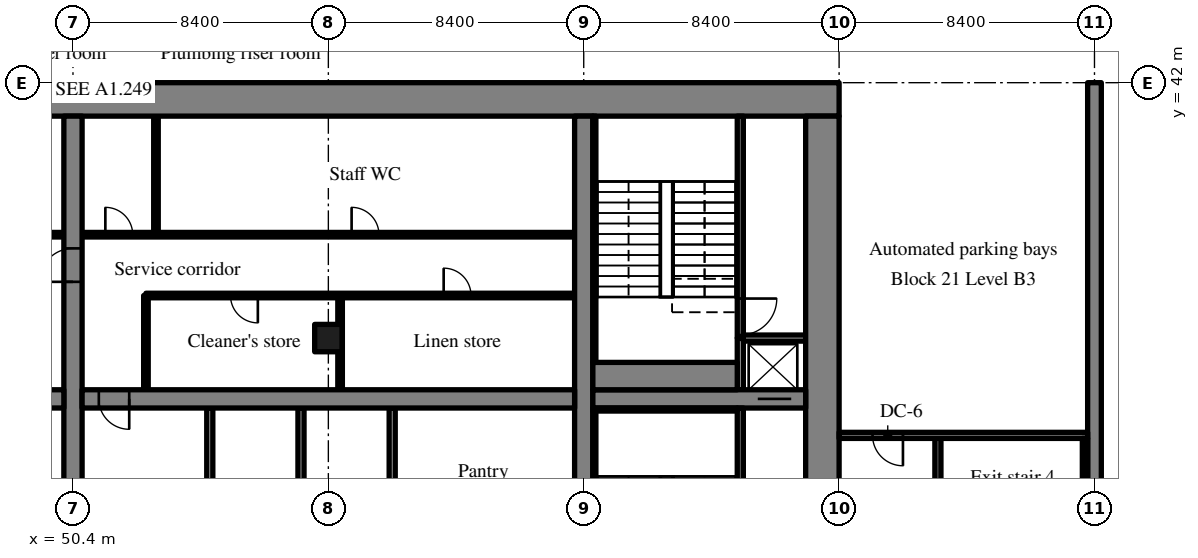
"""IFC4 building model, lengths in metres.
Left out: names, types, materials, properties, quantities, classifications, styles, units other than length and angle.
Written with IfcOpenShell. Run it as: python <this file> out.ifc"""

import sys

from ifc_helpers import new_model, si_unit, direction, frame, frame_2d, origin, origin_2d, place, context, subcontext, project, spatial, rectangle, extrude, source, transform, mapped, element, fill, save


model = new_model("IFC4")
c1 = context("Model", 3, precision=1e-05, world=origin(), true_north=direction((0.0, 1.0)))
c2 = subcontext(c1, "Body", "Model", "MODEL_VIEW")
j1 = project(units=[si_unit("LENGTHUNIT", "METRE"), si_unit("PLANEANGLEUNIT", "RADIAN")], contexts=[c1])
p1 = place(None, origin())
s1 = spatial("IfcSite", under=j1, at=p1, CompositionType="ELEMENT")
p2 = place(p1, origin())
s2 = spatial("IfcBuilding", under=s1, at=p2, CompositionType="ELEMENT")
p3 = place(p2, frame((0.0, 0.0, -13.5)))
s3 = spatial("IfcBuildingStorey", under=s2, at=p3, CompositionType="ELEMENT", Elevation=-13.5)
m1 = source(origin(), c2, "Body", "SweptSolid", [
    extrude(rectangle(XDim=50.4, YDim=1.1, at=frame_2d((25.2, 0.0))), origin(), (0.0, 0.0, 1.0), 4.52),
])
p4 = place(p3, frame((25.2, 41.45, -0.3), z_axis=(0.0, 0.0, 1.0), x_axis=(1.0, 0.0, 0.0)))
e1 = element("IfcWall", 1, at=p4, inside=s3, PredefinedType="SHEAR", context=c2, shape_type="MappedRepresentation", body=[
    mapped(m1, transform((0.0, 0.0, 0.0), scale=1.0)),
])
m2 = source(origin(), c2, "Body", "SweptSolid", [
    extrude(rectangle(XDim=17.8, YDim=1.1, at=frame_2d((8.9, 0.0))), origin(), (0.0, 0.0, 1.0), 4.52),
])
p5 = place(p3, frame((75.05, 23.1, -0.3), z_axis=(0.0, 0.0, 1.0), x_axis=(0.0, 1.0, 0.0)))
e2 = element("IfcWall", 2, at=p5, inside=s3, PredefinedType="SHEAR", context=c2, shape_type="MappedRepresentation", body=[
    mapped(m2, transform((0.0, 0.0, 0.0), scale=1.0)),
])
m3 = source(origin(), c2, "Body", "SweptSolid", [
    extrude(rectangle(XDim=17.8, YDim=0.6, at=frame_2d((8.9, 0.0))), origin(), (0.0, 0.0, 1.0), 4.52),
])
p6 = place(p3, frame((50.4, 23.1, -0.3), z_axis=(0.0, 0.0, 1.0), x_axis=(0.0, 1.0, 0.0)))
e3 = element("IfcWall", 3, at=p6, inside=s3, PredefinedType="SHEAR", context=c2, shape_type="MappedRepresentation", body=[
    mapped(m3, transform((0.0, 0.0, 0.0), scale=1.0)),
])
m4 = source(origin(), c2, "Body", "SweptSolid", [
    extrude(rectangle(XDim=1.1, YDim=2.1, at=frame_2d((0.55, 1.05))), frame((0.0, 0.31, 0.0), z_axis=(0.0, -1.0, 0.0), x_axis=(1.0, 0.0, 0.0)), (0.0, 0.0, 1.0), 0.62),
])
p7 = place(p6, frame((12.35, 0.0, 0.0)))
e4 = element("IfcOpeningElement", 4, at=p7, cuts=e3, PredefinedType="OPENING", context=c2, shape_type="MappedRepresentation", body=[
    mapped(m4, transform((0.0, 0.0, 0.0), scale=1.0)),
])
p8 = place(p3, frame((67.2, 23.1, -0.3), z_axis=(0.0, 0.0, 1.0), x_axis=(0.0, 1.0, 0.0)))
e5 = element("IfcWall", 5, at=p8, inside=s3, PredefinedType="SHEAR", context=c2, shape_type="MappedRepresentation", body=[
    mapped(m3, transform((0.0, 0.0, 0.0), scale=1.0)),
])
m5 = source(origin(), c2, "Body", "SweptSolid", [
    extrude(rectangle(XDim=16.2, YDim=0.6, at=frame_2d((8.1, 0.0))), origin(), (0.0, 0.0, 1.0), 4.52),
])
p9 = place(p3, frame((33.9, 31.6, -0.3), z_axis=(0.0, 0.0, 1.0), x_axis=(1.0, 0.0, 0.0)))
e6 = element("IfcWall", 6, at=p9, inside=s3, PredefinedType="SHEAR", context=c2, shape_type="MappedRepresentation", body=[
    mapped(m5, transform((0.0, 0.0, 0.0), scale=1.0)),
])
m6 = source(origin(), c2, "Body", "SweptSolid", [
    extrude(rectangle(XDim=1.0, YDim=2.1, at=frame_2d((0.5, 1.05))), frame((0.0, 0.31, 0.0), z_axis=(0.0, -1.0, 0.0), x_axis=(1.0, 0.0, 0.0)), (0.0, 0.0, 1.0), 0.62),
])
p10 = place(p9, frame((14.65, 0.0, 0.0)))
e7 = element("IfcOpeningElement", 7, at=p10, cuts=e6, PredefinedType="OPENING", context=c2, shape_type="MappedRepresentation", body=[
    mapped(m6, transform((0.0, 0.0, 0.0), scale=1.0)),
])
m7 = source(origin(), c2, "Body", "SweptSolid", [
    extrude(rectangle(XDim=16.2, YDim=0.6, at=frame_2d((8.1, 0.0))), origin(), (0.0, 0.0, 1.0), 4.52),
])
p11 = place(p3, frame((50.7, 31.6, -0.3), z_axis=(0.0, 0.0, 1.0), x_axis=(1.0, 0.0, 0.0)))
e8 = element("IfcWall", 8, at=p11, inside=s3, PredefinedType="SHEAR", context=c2, shape_type="MappedRepresentation", body=[
    mapped(m7, transform((0.0, 0.0, 0.0), scale=1.0)),
])
p12 = place(p11, frame((0.55, 0.0, 0.0)))
e9 = element("IfcOpeningElement", 9, at=p12, cuts=e8, PredefinedType="OPENING", context=c2, shape_type="MappedRepresentation", body=[
    mapped(m6, transform((0.0, 0.0, 0.0), scale=1.0)),
])
m8 = source(origin(), c2, "Body", "SweptSolid", [
    extrude(rectangle(XDim=7.0, YDim=0.6, at=frame_2d((3.5, 0.0))), origin(), (0.0, 0.0, 1.0), 4.52),
])
p13 = place(p3, frame((67.5, 31.6, -0.3), z_axis=(0.0, 0.0, 1.0), x_axis=(1.0, 0.0, 0.0)))
e10 = element("IfcWall", 10, at=p13, inside=s3, PredefinedType="SHEAR", context=c2, shape_type="MappedRepresentation", body=[
    mapped(m8, transform((0.0, 0.0, 0.0), scale=1.0)),
])
p14 = place(p13, frame((5.425, 0.0, 0.0)))
e11 = element("IfcOpeningElement", 11, at=p14, cuts=e10, PredefinedType="OPENING", context=c2, shape_type="MappedRepresentation", body=[
    mapped(m4, transform((0.0, 0.0, 0.0), scale=1.0)),
])
m9 = source(origin(), c2, "Body", "SweptSolid", [
    extrude(rectangle(XDim=20.0, YDim=0.45, at=frame_2d((10.0, 0.0))), origin(), (0.0, 0.0, 1.0), 4.52),
])
p15 = place(p3, frame((84.0, 22.0, -0.3), z_axis=(0.0, 0.0, 1.0), x_axis=(0.0, 1.0, 0.0)))
e12 = element("IfcWall", 12, at=p15, inside=s3, PredefinedType="SHEAR", context=c2, shape_type="MappedRepresentation", body=[
    mapped(m9, transform((0.0, 0.0, 0.0), scale=1.0)),
])
m10 = source(origin(), c2, "Body", "SweptSolid", [
    extrude(rectangle(XDim=0.9, YDim=0.9, at=origin_2d()), origin(), (0.0, 0.0, 1.0), 4.52),
])
p16 = place(p3, frame((58.8, 33.6, -0.3), z_axis=(0.0, 0.0, 1.0), x_axis=(1.0, 0.0, 0.0)))
e13 = element("IfcColumn", 13, at=p16, inside=s3, PredefinedType="COLUMN", context=c2, shape_type="MappedRepresentation", body=[
    mapped(m10, transform((0.0, 0.0, 0.0), scale=1.0)),
])
m11 = source(origin(), c2, "Body", "SweptSolid", [
    extrude(rectangle(XDim=16.2, YDim=0.15, at=frame_2d((8.1, 0.0))), origin(), (0.0, 0.0, 1.0), 4.22),
])
p17 = place(p3, frame((33.9, 37.0, 0.0), z_axis=(0.0, 0.0, 1.0), x_axis=(1.0, 0.0, 0.0)))
e14 = element("IfcWall", 14, at=p17, inside=s3, PredefinedType="PARTITIONING", context=c2, shape_type="MappedRepresentation", body=[
    mapped(m11, transform((0.0, 0.0, 0.0), scale=1.0)),
])
m12 = source(origin(), c2, "Body", "SweptSolid", [
    extrude(rectangle(XDim=0.9, YDim=2.1, at=frame_2d((0.45, 1.05))), frame((0.0, 0.085, 0.0), z_axis=(0.0, -1.0, 0.0), x_axis=(1.0, 0.0, 0.0)), (0.0, 0.0, 1.0), 0.17),
])
p18 = place(p17, frame((0.765, 0.0, 0.0)))
e15 = element("IfcOpeningElement", 15, at=p18, cuts=e14, PredefinedType="OPENING", context=c2, shape_type="MappedRepresentation", body=[
    mapped(m12, transform((0.0, 0.0, 0.0), scale=1.0)),
])
p19 = place(p17, frame((3.6, 0.0, 0.0)))
e16 = element("IfcOpeningElement", 16, at=p19, cuts=e14, PredefinedType="OPENING", context=c2, shape_type="MappedRepresentation", body=[
    mapped(m12, transform((0.0, 0.0, 0.0), scale=1.0)),
])
p20 = place(p17, frame((9.27, 0.0, 0.0)))
e17 = element("IfcOpeningElement", 17, at=p20, cuts=e14, PredefinedType="OPENING", context=c2, shape_type="MappedRepresentation", body=[
    mapped(m12, transform((0.0, 0.0, 0.0), scale=1.0)),
])
p21 = place(p17, frame((14.535, 0.0, 0.0)))
e18 = element("IfcOpeningElement", 18, at=p21, cuts=e14, PredefinedType="OPENING", context=c2, shape_type="MappedRepresentation", body=[
    mapped(m12, transform((0.0, 0.0, 0.0), scale=1.0)),
])
m13 = source(origin(), c2, "Body", "SweptSolid", [
    extrude(rectangle(XDim=8.2, YDim=0.2, at=frame_2d((4.1, 0.0))), origin(), (0.0, 0.0, 1.0), 4.22),
])
for number, where, z_axis, x_axis in (
    (19, (54.9, 23.1, 0.0), (0.0, 0.0, 1.0), (0.0, 1.0, 0.0)),
    (20, (60.9, 23.1, 0.0), (0.0, 0.0, 1.0), (0.0, 1.0, 0.0)),
    (21, (57.9, 23.1, 0.0), (0.0, 0.0, 1.0), (0.0, 1.0, 0.0)),
):
    element("IfcWall", number, at=place(p3, frame(where, z_axis=z_axis, x_axis=x_axis)), inside=s3, PredefinedType="PARTITIONING", context=c2, shape_type="MappedRepresentation", body=[
        mapped(m13, transform((0.0, 0.0, 0.0), scale=1.0)),
    ])
m14 = source(origin(), c2, "Body", "SweptSolid", [
    extrude(rectangle(XDim=3.1, YDim=0.15, at=frame_2d((1.55, 0.0))), origin(), (0.0, 0.0, 1.0), 4.22),
])
p22 = place(p3, frame((52.8, 31.9, 0.0), z_axis=(0.0, 0.0, 1.0), x_axis=(0.0, 1.0, 0.0)))
e22 = element("IfcWall", 22, at=p22, inside=s3, PredefinedType="PARTITIONING", context=c2, shape_type="MappedRepresentation", body=[
    mapped(m14, transform((0.0, 0.0, 0.0), scale=1.0)),
])
m15 = source(origin(), c2, "Body", "SweptSolid", [
    extrude(rectangle(XDim=14.1, YDim=0.15, at=frame_2d((7.05, 0.0))), origin(), (0.0, 0.0, 1.0), 4.22),
])
p23 = place(p3, frame((66.9, 35.0, 0.0), z_axis=(0.0, 0.0, 1.0), x_axis=(-1.0, 0.0, 0.0)))
e23 = element("IfcWall", 23, at=p23, inside=s3, PredefinedType="PARTITIONING", context=c2, shape_type="MappedRepresentation", body=[
    mapped(m15, transform((0.0, 0.0, 0.0), scale=1.0)),
])
p24 = place(p23, frame((3.407, 0.0, 0.0)))
e24 = element("IfcOpeningElement", 24, at=p24, cuts=e23, PredefinedType="OPENING", context=c2, shape_type="MappedRepresentation", body=[
    mapped(m12, transform((0.0, 0.0, 0.0), scale=1.0)),
])
p25 = place(p23, frame((10.419, 0.0, 0.0)))
e25 = element("IfcOpeningElement", 25, at=p25, cuts=e23, PredefinedType="OPENING", context=c2, shape_type="MappedRepresentation", body=[
    mapped(m12, transform((0.0, 0.0, 0.0), scale=1.0)),
])
m16 = source(origin(), c2, "Body", "SweptSolid", [
    extrude(rectangle(XDim=16.2, YDim=0.15, at=frame_2d((8.1, 0.0))), origin(), (0.0, 0.0, 1.0), 4.22),
])
p26 = place(p3, frame((66.9, 37.0, 0.0), z_axis=(0.0, 0.0, 1.0), x_axis=(-1.0, 0.0, 0.0)))
e26 = element("IfcWall", 26, at=p26, inside=s3, PredefinedType="PARTITIONING", context=c2, shape_type="MappedRepresentation", body=[
    mapped(m16, transform((0.0, 0.0, 0.0), scale=1.0)),
])
p27 = place(p26, frame((6.435, 0.0, 0.0)))
e27 = element("IfcOpeningElement", 27, at=p27, cuts=e26, PredefinedType="OPENING", context=c2, shape_type="MappedRepresentation", body=[
    mapped(m12, transform((0.0, 0.0, 0.0), scale=1.0)),
])
p28 = place(p26, frame((14.535, 0.0, 0.0)))
e28 = element("IfcOpeningElement", 28, at=p28, cuts=e26, PredefinedType="OPENING", context=c2, shape_type="MappedRepresentation", body=[
    mapped(m12, transform((0.0, 0.0, 0.0), scale=1.0)),
])
p29 = place(p3, frame((59.186, 31.9, 0.0), z_axis=(0.0, 0.0, 1.0), x_axis=(0.0, 1.0, 0.0)))
e29 = element("IfcWall", 29, at=p29, inside=s3, PredefinedType="PARTITIONING", context=c2, shape_type="MappedRepresentation", body=[
    mapped(m14, transform((0.0, 0.0, 0.0), scale=1.0)),
])
m17 = source(origin(), c2, "Body", "SweptSolid", [
    extrude(rectangle(XDim=3.9, YDim=0.15, at=frame_2d((1.95, 0.0))), origin(), (0.0, 0.0, 1.0), 4.22),
])
p30 = place(p3, frame((53.13, 37.0, 0.0), z_axis=(0.0, 0.0, 1.0), x_axis=(0.0, 1.0, 0.0)))
e30 = element("IfcWall", 30, at=p30, inside=s3, PredefinedType="PARTITIONING", context=c2, shape_type="MappedRepresentation", body=[
    mapped(m17, transform((0.0, 0.0, 0.0), scale=1.0)),
])
m18 = source(origin(), c2, "Body", "SweptSolid", [
    extrude(rectangle(XDim=8.2, YDim=0.2, at=frame_2d((4.1, 0.0))), origin(), (0.0, 0.0, 1.0), 4.52),
])
p31 = place(p3, frame((72.35, 23.1, -0.3), z_axis=(0.0, 0.0, 1.0), x_axis=(0.0, 1.0, 0.0)))
e31 = element("IfcWall", 31, at=p31, inside=s3, PredefinedType="SOLIDWALL", context=c2, shape_type="MappedRepresentation", body=[
    mapped(m18, transform((0.0, 0.0, 0.0), scale=1.0)),
])
m19 = source(origin(), c2, "Body", "SweptSolid", [
    extrude(rectangle(XDim=1.2, YDim=2.1, at=frame_2d((0.6, 1.05))), frame((0.0, 0.11, 0.0), z_axis=(0.0, -1.0, 0.0), x_axis=(1.0, 0.0, 0.0)), (0.0, 0.0, 1.0), 0.22),
])
p32 = place(p31, frame((0.5, 0.0, 0.0)))
e32 = element("IfcOpeningElement", 32, at=p32, cuts=e31, PredefinedType="OPENING", context=c2, shape_type="MappedRepresentation", body=[
    mapped(m19, transform((0.0, 0.0, 0.0), scale=1.0)),
])
m20 = source(origin(), c2, "Body", "SweptSolid", [
    extrude(rectangle(XDim=1.7, YDim=0.2, at=frame_2d((0.85, 0.0))), origin(), (0.0, 0.0, 1.0), 4.22),
])
p33 = place(p3, frame((72.35, 31.9, 0.0), z_axis=(0.0, 0.0, 1.0), x_axis=(0.0, 1.0, 0.0)))
e33 = element("IfcWall", 33, at=p33, inside=s3, PredefinedType="SOLIDWALL", context=c2, shape_type="MappedRepresentation", body=[
    mapped(m20, transform((0.0, 0.0, 0.0), scale=1.0)),
])
m21 = source(origin(), c2, "Body", "SweptSolid", [
    extrude(rectangle(XDim=2.05, YDim=0.2, at=frame_2d((1.025, 0.0))), origin(), (0.0, 0.0, 1.0), 4.22),
])
p34 = place(p3, frame((72.45, 33.6, 0.0), z_axis=(0.0, 0.0, 1.0), x_axis=(1.0, 0.0, 0.0)))
e34 = element("IfcWall", 34, at=p34, inside=s3, PredefinedType="SOLIDWALL", context=c2, shape_type="MappedRepresentation", body=[
    mapped(m21, transform((0.0, 0.0, 0.0), scale=1.0)),
])
m22 = source(origin(), c2, "Body", "SweptSolid", [
    extrude(rectangle(XDim=7.3, YDim=0.2, at=frame_2d((3.65, 0.0))), origin(), (0.0, 0.0, 1.0), 4.52),
])
p35 = place(p3, frame((72.35, 33.6, -0.3), z_axis=(0.0, 0.0, 1.0), x_axis=(0.0, 1.0, 0.0)))
e35 = element("IfcWall", 35, at=p35, inside=s3, PredefinedType="SOLIDWALL", context=c2, shape_type="MappedRepresentation", body=[
    mapped(m22, transform((0.0, 0.0, 0.0), scale=1.0)),
])
p36 = place(p35, frame((0.1, 0.0, 0.0)))
e36 = element("IfcOpeningElement", 36, at=p36, cuts=e35, PredefinedType="OPENING", context=c2, shape_type="MappedRepresentation", body=[
    mapped(m19, transform((0.0, 0.0, 0.0), scale=1.0)),
])
m23 = source(origin(), c2, "Body", "SweptSolid", [
    extrude(rectangle(XDim=8.3, YDim=0.2, at=frame_2d((4.15, 0.0))), origin(), (0.0, 0.0, 1.0), 4.52),
])
p37 = place(p3, frame((78.85, 22.1, -0.3), z_axis=(0.0, 0.0, 1.0), x_axis=(0.0, 1.0, 0.0)))
e37 = element("IfcWall", 37, at=p37, inside=s3, PredefinedType="SOLIDWALL", context=c2, shape_type="MappedRepresentation", body=[
    mapped(m23, transform((0.0, 0.0, 0.0), scale=1.0)),
])
p38 = place(p37, frame((0.6, 0.0, 0.0)))
e38 = element("IfcOpeningElement", 38, at=p38, cuts=e37, PredefinedType="OPENING", context=c2, shape_type="MappedRepresentation", body=[
    mapped(m19, transform((0.0, 0.0, 0.0), scale=1.0)),
])
m24 = source(origin(), c2, "Body", "SweptSolid", [
    extrude(rectangle(XDim=8.175, YDim=0.2, at=frame_2d((4.087, 0.0))), origin(), (0.0, 0.0, 1.0), 4.52),
])
p39 = place(p3, frame((83.775, 30.4, -0.3), z_axis=(0.0, 0.0, 1.0), x_axis=(-1.0, 0.0, 0.0)))
e39 = element("IfcWall", 39, at=p39, inside=s3, PredefinedType="SOLIDWALL", context=c2, shape_type="MappedRepresentation", body=[
    mapped(m24, transform((0.0, 0.0, 0.0), scale=1.0)),
])
m25 = source(origin(), c2, "Body", "SweptSolid", [
    extrude(rectangle(XDim=1.0, YDim=2.1, at=frame_2d((0.5, 1.05))), frame((0.0, 0.11, 0.0), z_axis=(0.0, -1.0, 0.0), x_axis=(1.0, 0.0, 0.0)), (0.0, 0.0, 1.0), 0.22),
])
p40 = place(p39, frame((6.075, 0.0, 0.0)))
e40 = element("IfcOpeningElement", 40, at=p40, cuts=e39, PredefinedType="OPENING", context=c2, shape_type="MappedRepresentation", body=[
    mapped(m25, transform((0.0, 0.0, 0.0), scale=1.0)),
])
m26 = source(origin(), c2, "Body", "SweptSolid", [
    extrude(rectangle(XDim=4.75, YDim=0.1, at=frame_2d((2.375, 0.0))), origin(), (0.0, 0.0, 1.0), 4.52),
])
p41 = place(p3, frame((67.5, 31.25, -0.3), z_axis=(0.0, 0.0, 1.0), x_axis=(1.0, 0.0, 0.0)))
e41 = element("IfcWall", 41, at=p41, inside=s3, PredefinedType="SOLIDWALL", context=c2, shape_type="MappedRepresentation", body=[
    mapped(m26, transform((0.0, 0.0, 0.0), scale=1.0)),
])
m27 = source(origin(), c2, "Body", "SweptSolid", [
    extrude(rectangle(XDim=8.1, YDim=0.1, at=frame_2d((4.05, 0.0))), origin(), (0.0, 0.0, 1.0), 4.52),
])
p42 = place(p3, frame((67.55, 23.1, -0.3), z_axis=(0.0, 0.0, 1.0), x_axis=(0.0, 1.0, 0.0)))
e42 = element("IfcWall", 42, at=p42, inside=s3, PredefinedType="SOLIDWALL", context=c2, shape_type="MappedRepresentation", body=[
    mapped(m27, transform((0.0, 0.0, 0.0), scale=1.0)),
])
m28 = source(origin(), c2, "Body", "SweptSolid", [
    extrude(rectangle(XDim=4.75, YDim=0.9, at=frame_2d((2.375, 0.0))), origin(), (0.0, 0.0, 1.0), 4.52),
])
p43 = place(p3, frame((67.5, 32.35, -0.3), z_axis=(0.0, 0.0, 1.0), x_axis=(1.0, 0.0, 0.0)))
e43 = element("IfcWall", 43, at=p43, inside=s3, PredefinedType="SOLIDWALL", context=c2, shape_type="MappedRepresentation", body=[
    mapped(m28, transform((0.0, 0.0, 0.0), scale=1.0)),
])
p44 = place(p3, frame((67.55, 32.8, -0.3), z_axis=(0.0, 0.0, 1.0), x_axis=(0.0, 1.0, 0.0)))
e44 = element("IfcWall", 44, at=p44, inside=s3, PredefinedType="SOLIDWALL", context=c2, shape_type="MappedRepresentation", body=[
    mapped(m27, transform((0.0, 0.0, 0.0), scale=1.0)),
])
m29 = source(origin(), c2, "Body", "SweptSolid", [
    extrude(rectangle(XDim=8.1, YDim=0.175, at=frame_2d((4.05, 0.0))), origin(), (0.0, 0.0, 1.0), 4.52),
])
p45 = place(p3, frame((83.688, 22.2, -0.3), z_axis=(0.0, 0.0, 1.0), x_axis=(0.0, 1.0, 0.0)))
e45 = element("IfcWall", 45, at=p45, inside=s3, PredefinedType="SOLIDWALL", context=c2, shape_type="MappedRepresentation", body=[
    mapped(m29, transform((0.0, 0.0, 0.0), scale=1.0)),
])
m30 = source(origin(), c2, "Body", "SweptSolid", [
    extrude(rectangle(XDim=1.0, YDim=2.1, at=frame_2d((0.5, 1.05))), frame((0.0, 0.025, 0.0), z_axis=(0.0, -1.0, 0.0), x_axis=(1.0, 0.0, 0.0)), (0.0, 0.0, 1.0), 0.05),
])
p46 = place(p12, origin())
e46 = element("IfcDoor", 46, at=p46, inside=s3, OperationType="SINGLE_SWING_RIGHT", PredefinedType="DOOR", context=c2, shape_type="MappedRepresentation", body=[
    mapped(m30, transform((0.0, 0.0, 0.0), scale=1.0)),
])
fill(e9, e46)
m31 = source(origin(), c2, "Body", "SweptSolid", [
    extrude(rectangle(XDim=0.9, YDim=2.1, at=frame_2d((0.45, 1.05))), frame((0.0, 0.025, 0.0), z_axis=(0.0, -1.0, 0.0), x_axis=(1.0, 0.0, 0.0)), (0.0, 0.0, 1.0), 0.05),
])
p47 = place(p24, origin())
e47 = element("IfcDoor", 47, at=p47, inside=s3, OperationType="SINGLE_SWING_RIGHT", PredefinedType="DOOR", context=c2, shape_type="MappedRepresentation", body=[
    mapped(m31, transform((0.0, 0.0, 0.0), scale=1.0)),
])
fill(e24, e47)
p48 = place(p25, origin())
e48 = element("IfcDoor", 48, at=p48, inside=s3, OperationType="SINGLE_SWING_LEFT", PredefinedType="DOOR", context=c2, shape_type="MappedRepresentation", body=[
    mapped(m31, transform((0.0, 0.0, 0.0), scale=1.0)),
])
fill(e25, e48)
p49 = place(p27, origin())
e49 = element("IfcDoor", 49, at=p49, inside=s3, OperationType="SINGLE_SWING_RIGHT", PredefinedType="DOOR", context=c2, shape_type="MappedRepresentation", body=[
    mapped(m31, transform((0.0, 0.0, 0.0), scale=1.0)),
])
fill(e27, e49)
p50 = place(p28, origin())
e50 = element("IfcDoor", 50, at=p50, inside=s3, OperationType="SINGLE_SWING_RIGHT", PredefinedType="DOOR", context=c2, shape_type="MappedRepresentation", body=[
    mapped(m31, transform((0.0, 0.0, 0.0), scale=1.0)),
])
fill(e28, e50)
m32 = source(origin(), c2, "Body", "SweptSolid", [
    extrude(rectangle(XDim=1.1, YDim=2.1, at=frame_2d((0.55, 1.05))), frame((0.0, 0.025, 0.0), z_axis=(0.0, -1.0, 0.0), x_axis=(1.0, 0.0, 0.0)), (0.0, 0.0, 1.0), 0.05),
])
p51 = place(p14, origin())
e51 = element("IfcDoor", 51, at=p51, inside=s3, OperationType="SLIDING_TO_RIGHT", PredefinedType="DOOR", context=c2, shape_type="MappedRepresentation", body=[
    mapped(m32, transform((0.0, 0.0, 0.0), scale=1.0)),
])
fill(e11, e51)
m33 = source(origin(), c2, "Body", "SweptSolid", [
    extrude(rectangle(XDim=1.2, YDim=2.1, at=frame_2d((0.6, 1.05))), frame((0.0, 0.025, 0.0), z_axis=(0.0, -1.0, 0.0), x_axis=(1.0, 0.0, 0.0)), (0.0, 0.0, 1.0), 0.05),
])
p52 = place(p36, origin())
e52 = element("IfcDoor", 52, at=p52, inside=s3, OperationType="SINGLE_SWING_RIGHT", PredefinedType="DOOR", context=c2, shape_type="MappedRepresentation", body=[
    mapped(m33, transform((0.0, 0.0, 0.0), scale=1.0)),
])
fill(e36, e52)
p53 = place(p40, origin())
e53 = element("IfcDoor", 53, at=p53, inside=s3, OperationType="SINGLE_SWING_LEFT", PredefinedType="DOOR", context=c2, shape_type="MappedRepresentation", body=[
    mapped(m30, transform((0.0, 0.0, 0.0), scale=1.0)),
])
fill(e40, e53)
p54 = place(p7, origin())
e54 = element("IfcDoor", 54, at=p54, inside=s3, OperationType="SINGLE_SWING_LEFT", PredefinedType="DOOR", context=c2, shape_type="MappedRepresentation", body=[
    mapped(m32, transform((0.0, 0.0, 0.0), scale=1.0)),
])
fill(e4, e54)
save(model, sys.argv[1])
